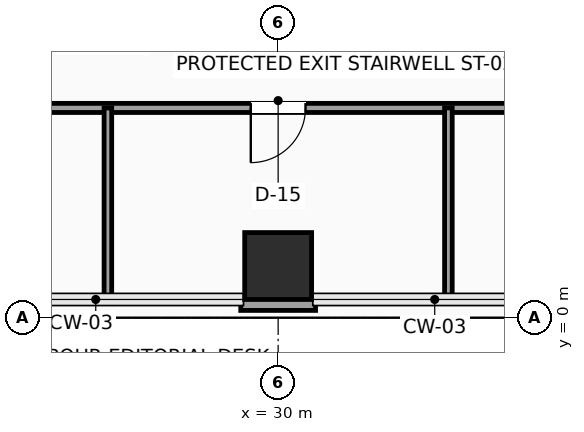
"""IFC4 building model, lengths in metres.
Left out: names, types, materials, properties, quantities, classifications, styles, units other than length and angle.
Written with IfcOpenShell. Run it as: python <this file> out.ifc"""

import sys

from ifc_helpers import new_model, si_unit, direction, frame, frame_2d, origin, origin_2d, place, context, subcontext, project, spatial, rectangle, extrude, element, fill, save


model = new_model("IFC4")
c1 = context("Model", 3, precision=1e-05, world=origin(), true_north=direction((0.0, 1.0)))
c2 = subcontext(c1, "Body", "Model", "MODEL_VIEW")
j1 = project(units=[si_unit("LENGTHUNIT", "METRE"), si_unit("PLANEANGLEUNIT", "RADIAN")], contexts=[c1])
p1 = place(None, origin())
s1 = spatial("IfcSite", under=j1, at=p1, CompositionType="ELEMENT")
p2 = place(p1, origin())
s2 = spatial("IfcBuilding", under=s1, at=p2, CompositionType="ELEMENT")
p3 = place(p2, frame((0.0, 0.0, 99.6)))
s3 = spatial("IfcBuildingStorey", under=s2, at=p3, CompositionType="ELEMENT", Elevation=99.6)
p4 = place(p3, frame((30.0, 0.85, 0.0), z_axis=(0.0, 0.0, 1.0), x_axis=(1.0, 0.0, 0.0)))
e1 = element("IfcColumn", 1, at=p4, inside=s3, PredefinedType="COLUMN", context=c2, shape_type="SweptSolid", body=[
    extrude(rectangle(XDim=1.1, YDim=1.1, at=origin_2d()), origin(), (0.0, 0.0, 1.0), 3.75),
])
p5 = place(p3, frame((30.615, 0.24, 0.0), z_axis=(0.0, 0.0, 1.0), x_axis=(-1.0, 0.0, 0.0)))
e2 = element("IfcWall", 2, at=p5, inside=s3, PredefinedType="SOLIDWALL", context=c2, shape_type="SweptSolid", body=[
    extrude(rectangle(XDim=1.23, YDim=0.24, at=frame_2d((0.615, 0.0))), origin(), (0.0, 0.0, 1.0), 3.525),
])
p6 = place(p3, frame((36.15, 3.45, 0.0), z_axis=(0.0, 0.0, 1.0), x_axis=(-1.0, 0.0, 0.0)))
e3 = element("IfcWall", 3, at=p6, inside=s3, PredefinedType="PARTITIONING", context=c2, shape_type="SweptSolid", body=[
    extrude(rectangle(XDim=14.6, YDim=0.15, at=frame_2d((7.3, 0.0))), origin(), (0.0, 0.0, 1.0), 3.067),
])
p7 = place(p6, frame((11.325, 0.0, 0.0)))
e4 = element("IfcOpeningElement", 4, at=p7, cuts=e3, PredefinedType="OPENING", context=c2, shape_type="SweptSolid", body=[
    extrude(rectangle(XDim=0.9, YDim=2.1, at=frame_2d((0.45, 1.05))), frame((0.0, 0.085, 0.0), z_axis=(0.0, -1.0, 0.0), x_axis=(1.0, 0.0, 0.0)), (0.0, 0.0, 1.0), 0.17),
])
p8 = place(p6, frame((5.7, 0.0, 0.0)))
e5 = element("IfcOpeningElement", 5, at=p8, cuts=e3, PredefinedType="OPENING", context=c2, shape_type="SweptSolid", body=[
    extrude(rectangle(XDim=0.9, YDim=2.1, at=frame_2d((0.45, 1.05))), frame((0.0, 0.085, 0.0), z_axis=(0.0, -1.0, 0.0), x_axis=(1.0, 0.0, 0.0)), (0.0, 0.0, 1.0), 0.17),
])
for number, where, z_axis, x_axis in (
    (6, (27.2, 0.3, 0.0), (0.0, 0.0, 1.0), (0.0, 1.0, 0.0)),
    (7, (32.8, 0.3, 0.0), (0.0, 0.0, 1.0), (0.0, 1.0, 0.0)),
):
    element("IfcWall", number, at=place(p3, frame(where, z_axis=z_axis, x_axis=x_axis)), inside=s3, PredefinedType="PARTITIONING", context=c2, shape_type="SweptSolid", body=[
        extrude(rectangle(XDim=3.15, YDim=0.125, at=frame_2d((1.575, 0.0))), origin(), (0.0, 0.0, 1.0), 3.525),
    ])
p9 = place(p8, origin())
e8 = element("IfcDoor", 8, at=p9, inside=s3, OperationType="SINGLE_SWING_RIGHT", PredefinedType="DOOR", context=c2, shape_type="SweptSolid", body=[
    extrude(rectangle(XDim=0.9, YDim=2.1, at=frame_2d((0.45, 1.05))), frame((0.0, 0.025, 0.0), z_axis=(0.0, -1.0, 0.0), x_axis=(1.0, 0.0, 0.0)), (0.0, 0.0, 1.0), 0.05),
])
fill(e5, e8)
save(model, sys.argv[1])
